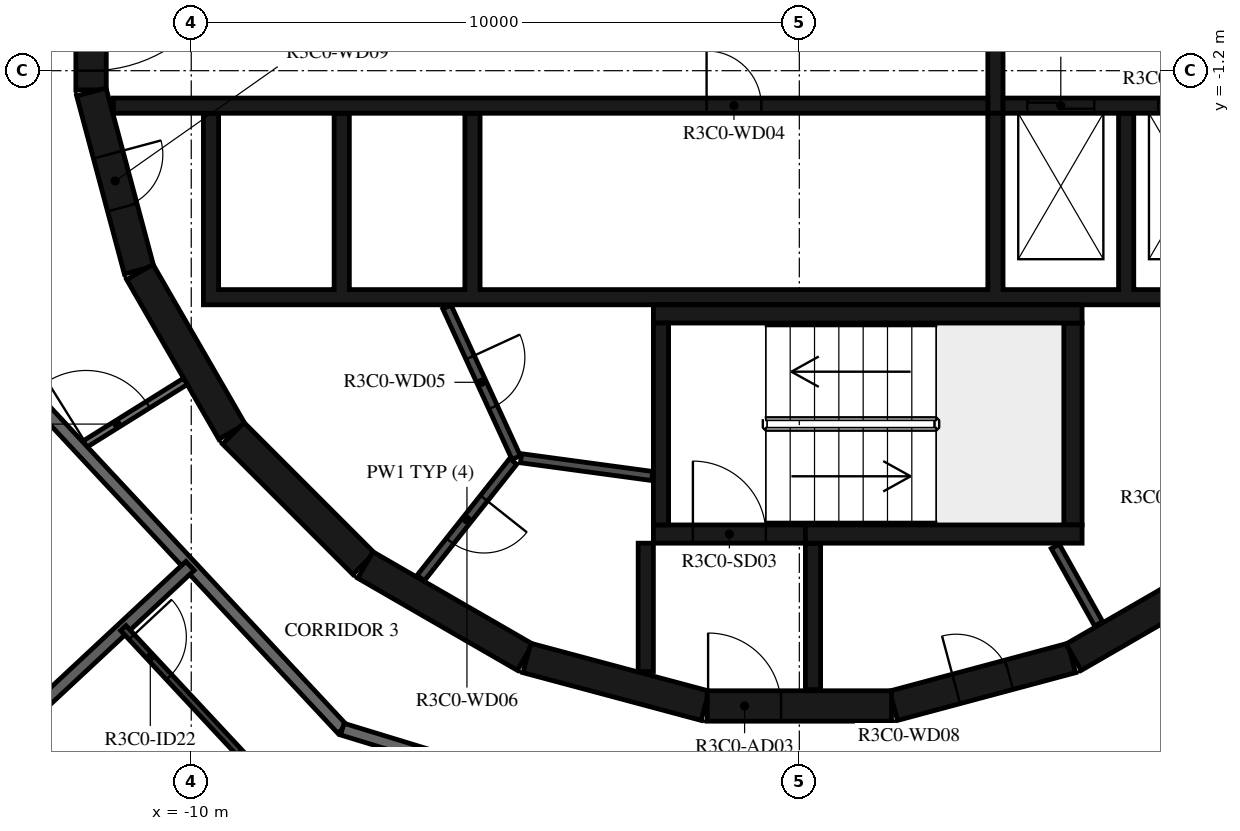
"""IFC4 building model, lengths in metres.
Left out: names, types, materials, properties, quantities, classifications, styles, units other than length and angle.
Written with IfcOpenShell. Run it as: python <this file> out.ifc"""

import sys

from ifc_helpers import new_model, si_unit, direction, frame, frame_2d, origin, place, context, subcontext, project, spatial, polyline, rectangle, outline, extrude, element, fill, save


model = new_model("IFC4")
c1 = context("Model", 3, precision=1e-05, world=origin(), true_north=direction((0.0, 1.0)))
c2 = subcontext(c1, "Body", "Model", "MODEL_VIEW")
j1 = project(units=[si_unit("LENGTHUNIT", "METRE"), si_unit("PLANEANGLEUNIT", "RADIAN")], contexts=[c1])
p1 = place(None, origin())
s1 = spatial("IfcSite", under=j1, at=p1, CompositionType="ELEMENT")
p2 = place(p1, origin())
s2 = spatial("IfcBuilding", under=s1, at=p2, CompositionType="ELEMENT")
p3 = place(p2, frame((0.0, 0.0, 141.4)))
s3 = spatial("IfcBuildingStorey", under=s2, at=p3, CompositionType="ELEMENT", Elevation=141.4)
p4 = place(p3, frame((1.55, -11.643, 0.0), z_axis=(0.0, 0.0, 1.0), x_axis=(0.965948410781, 0.258734743916, 0.0)))
e1 = element("IfcWall", 1, at=p4, inside=s3, PredefinedType="SHEAR", context=c2, shape_type="SweptSolid", body=[
    extrude(rectangle(XDim=3.033, YDim=0.5, at=frame_2d((1.516, 0.0))), origin(), (0.0, 0.0, 1.0), 3.05),
])
p5 = place(p4, frame((1.066, 0.0, 0.0)))
e2 = element("IfcOpeningElement", 2, at=p5, cuts=e1, PredefinedType="OPENING", context=c2, shape_type="SweptSolid", body=[
    extrude(rectangle(XDim=0.9, YDim=2.1, at=frame_2d((0.45, 1.05))), frame((0.0, 0.26, 0.0), z_axis=(0.0, -1.0, 0.0), x_axis=(1.0, 0.0, 0.0)), (0.0, 0.0, 1.0), 0.52),
])
p6 = place(p3, frame((4.51, -10.845, 0.0), z_axis=(0.0, 0.0, 1.0), x_axis=(0.865975092491, 0.500087131594, 0.0)))
e3 = element("IfcWall", 3, at=p6, inside=s3, PredefinedType="SHEAR", context=c2, shape_type="SweptSolid", body=[
    extrude(rectangle(XDim=3.033, YDim=0.5, at=frame_2d((1.516, 0.0))), origin(), (0.0, 0.0, 1.0), 3.05),
])
p7 = place(p3, frame((-11.647, 1.516, 0.0), z_axis=(0.0, 0.0, 1.0), x_axis=(0.0, -1.0, 0.0)))
e4 = element("IfcWall", 4, at=p7, inside=s3, PredefinedType="SHEAR", context=c2, shape_type="SweptSolid", body=[
    extrude(rectangle(XDim=3.033, YDim=0.5, at=frame_2d((1.516, 0.0))), origin(), (0.0, 0.0, 1.0), 3.05),
])
p8 = place(p7, frame((0.316, 0.0, 0.0)))
e5 = element("IfcOpeningElement", 5, at=p8, cuts=e4, PredefinedType="OPENING", context=c2, shape_type="SweptSolid", body=[
    extrude(rectangle(XDim=2.4, YDim=2.1, at=frame_2d((1.2, 1.05))), frame((0.0, 0.26, 0.0), z_axis=(0.0, -1.0, 0.0), x_axis=(1.0, 0.0, 0.0)), (0.0, 0.0, 1.0), 0.52),
])
p9 = place(p3, frame((-11.643, -1.55, 0.0), z_axis=(0.0, 0.0, 1.0), x_axis=(0.258734743916, -0.965948410781, 0.0)))
e6 = element("IfcWall", 6, at=p9, inside=s3, PredefinedType="SHEAR", context=c2, shape_type="SweptSolid", body=[
    extrude(rectangle(XDim=3.033, YDim=0.5, at=frame_2d((1.516, 0.0))), origin(), (0.0, 0.0, 1.0), 3.05),
])
p10 = place(p9, frame((1.066, 0.0, 0.0)))
e7 = element("IfcOpeningElement", 7, at=p10, cuts=e6, PredefinedType="OPENING", context=c2, shape_type="SweptSolid", body=[
    extrude(rectangle(XDim=0.9, YDim=2.1, at=frame_2d((0.45, 1.05))), frame((0.0, 0.26, 0.0), z_axis=(0.0, -1.0, 0.0), x_axis=(1.0, 0.0, 0.0)), (0.0, 0.0, 1.0), 0.52),
])
p11 = place(p3, frame((-10.845, -4.51, 0.0), z_axis=(0.0, 0.0, 1.0), x_axis=(0.500087131594, -0.865975092491, 0.0)))
e8 = element("IfcWall", 8, at=p11, inside=s3, PredefinedType="SHEAR", context=c2, shape_type="SweptSolid", body=[
    extrude(rectangle(XDim=3.033, YDim=0.5, at=frame_2d((1.516, 0.0))), origin(), (0.0, 0.0, 1.0), 3.05),
])
p12 = place(p3, frame((-9.308, -7.164, 0.0), z_axis=(0.0, 0.0, 1.0), x_axis=(0.707106781187, -0.707106781187, 0.0)))
e9 = element("IfcWall", 9, at=p12, inside=s3, PredefinedType="SHEAR", context=c2, shape_type="SweptSolid", body=[
    extrude(rectangle(XDim=3.032, YDim=0.5, at=frame_2d((1.516, 0.0))), origin(), (0.0, 0.0, 1.0), 3.05),
])
for number, where, z_axis, x_axis in (
    (10, (-7.137, -9.329, 0.0), (0.0, 0.0, 1.0), (0.866, -0.5, 0.0)),
    (11, (-4.479, -10.858, 0.0), (0.0, 0.0, 1.0), (0.966, -0.259, 0.0)),
):
    element("IfcWall", number, at=place(p3, frame(where, z_axis=z_axis, x_axis=x_axis)), inside=s3, PredefinedType="SHEAR", context=c2, shape_type="SweptSolid", body=[
        extrude(rectangle(XDim=3.033, YDim=0.5, at=frame_2d((1.516, 0.0))), origin(), (0.0, 0.0, 1.0), 3.05),
    ])
p13 = place(p3, frame((-1.516, -11.647, 0.0), z_axis=(0.0, 0.0, 1.0), x_axis=(1.0, 0.0, 0.0)))
e12 = element("IfcWall", 12, at=p13, inside=s3, PredefinedType="SHEAR", context=c2, shape_type="SweptSolid", body=[
    extrude(rectangle(XDim=3.033, YDim=0.5, at=frame_2d((1.516, 0.0))), origin(), (0.0, 0.0, 1.0), 3.05),
])
p14 = place(p13, frame((0.016, 0.0, 0.0)))
e13 = element("IfcOpeningElement", 13, at=p14, cuts=e12, PredefinedType="OPENING", context=c2, shape_type="SweptSolid", body=[
    extrude(rectangle(XDim=1.2, YDim=2.1, at=frame_2d((0.6, 1.05))), frame((0.0, 0.26, 0.0), z_axis=(0.0, -1.0, 0.0), x_axis=(1.0, 0.0, 0.0)), (0.0, 0.0, 1.0), 0.52),
])
p15 = place(p3, frame((-2.275, -8.67, 0.0), z_axis=(0.0, 0.0, 1.0), x_axis=(0.0, 1.0, 0.0)))
e14 = element("IfcWall", 14, at=p15, inside=s3, PredefinedType="SHEAR", context=c2, shape_type="SweptSolid", body=[
    extrude(rectangle(XDim=3.32, YDim=0.25, at=frame_2d((1.66, 0.0))), origin(), (0.0, 0.0, 1.0), 3.05),
])
p16 = place(p3, frame((-2.4, -5.2, 0.0), z_axis=(0.0, 0.0, 1.0), x_axis=(1.0, 0.0, 0.0)))
e15 = element("IfcWall", 15, at=p16, inside=s3, PredefinedType="SHEAR", context=c2, shape_type="SweptSolid", body=[
    extrude(rectangle(XDim=7.05, YDim=0.3, at=frame_2d((3.525, 0.0))), origin(), (0.0, 0.0, 1.0), 3.05),
])
p17 = place(p3, frame((4.5, -8.67, 0.0), z_axis=(0.0, 0.0, 1.0), x_axis=(0.0, 1.0, 0.0)))
e16 = element("IfcWall", 16, at=p17, inside=s3, PredefinedType="SHEAR", context=c2, shape_type="SweptSolid", body=[
    extrude(rectangle(XDim=3.32, YDim=0.3, at=frame_2d((1.66, 0.0))), origin(), (0.0, 0.0, 1.0), 3.05),
])
p18 = place(p3, frame((0.1, -8.82, 0.0), z_axis=(0.0, 0.0, 1.0), x_axis=(1.0, 0.0, 0.0)))
e17 = element("IfcWall", 17, at=p18, inside=s3, PredefinedType="SHEAR", context=c2, shape_type="SweptSolid", body=[
    extrude(rectangle(XDim=4.55, YDim=0.3, at=frame_2d((2.275, 0.0))), origin(), (0.0, 0.0, 1.0), 3.05),
])
p19 = place(p3, frame((-2.4, -8.82, 0.0), z_axis=(0.0, 0.0, 1.0), x_axis=(1.0, 0.0, 0.0)))
e18 = element("IfcWall", 18, at=p19, inside=s3, PredefinedType="SHEAR", context=c2, shape_type="SweptSolid", body=[
    extrude(rectangle(XDim=2.5, YDim=0.3, at=frame_2d((1.25, 0.0))), origin(), (0.0, 0.0, 1.0), 3.05),
])
p20 = place(p19, frame((0.65, 0.0, 0.0)))
e19 = element("IfcOpeningElement", 19, at=p20, cuts=e18, PredefinedType="OPENING", context=c2, shape_type="SweptSolid", body=[
    extrude(rectangle(XDim=1.2, YDim=2.1, at=frame_2d((0.6, 1.05))), frame((0.0, 0.16, 0.0), z_axis=(0.0, -1.0, 0.0), x_axis=(1.0, 0.0, 0.0)), (0.0, 0.0, 1.0), 0.32),
])
p21 = place(p3, frame((-2.525, -8.97, 0.0), z_axis=(0.0, 0.0, 1.0), x_axis=(0.0, -1.0, 0.0)))
e20 = element("IfcWall", 20, at=p21, inside=s3, PredefinedType="SHEAR", context=c2, shape_type="SweptSolid", body=[
    extrude(rectangle(XDim=2.11, YDim=0.25, at=frame_2d((1.055, 0.0))), origin(), (0.0, 0.0, 1.0), 3.05),
])
p22 = place(p3, frame((0.225, -8.97, 0.0), z_axis=(0.0, 0.0, 1.0), x_axis=(0.0, -1.0, 0.0)))
e21 = element("IfcWall", 21, at=p22, inside=s3, PredefinedType="SHEAR", context=c2, shape_type="SweptSolid", body=[
    extrude(rectangle(XDim=2.41, YDim=0.25, at=frame_2d((1.205, 0.0))), origin(), (0.0, 0.0, 1.0), 3.05),
])
p23 = place(p3, origin())
e22 = element("IfcWall", 22, at=p23, inside=s3, PredefinedType="SHEAR", context=c2, shape_type="SweptSolid", body=[
    extrude(outline(polyline([(9.8, -5.05), (9.8, -4.8), (9.8, -1.9), (9.55, -1.9), (9.55, -4.8), (7.65, -4.8), (7.65, -1.9), (7.4, -1.9), (7.4, -4.8), (5.5, -4.8), (5.5, -1.9), (5.25, -1.9), (5.25, -4.8), (3.35, -4.8), (3.35, -1.9), (3.1, -1.9), (3.1, -4.8), (-5.25, -4.8), (-5.25, -1.9), (-5.5, -1.9), (-5.5, -4.8), (-7.4, -4.8), (-7.4, -1.9), (-7.65, -1.9), (-7.65, -4.8), (-9.55, -4.8), (-9.55, -1.9), (-9.8, -1.9), (-9.8, -4.8), (-9.8, -5.05), (9.8, -5.05)])), origin(), (0.0, 0.0, 1.0), 3.05),
])
p24 = place(p3, frame((-11.28, -1.775, 0.0), z_axis=(0.0, 0.0, 1.0), x_axis=(1.0, 0.0, 0.0)))
e23 = element("IfcWall", 23, at=p24, inside=s3, PredefinedType="SHEAR", context=c2, shape_type="SweptSolid", body=[
    extrude(rectangle(XDim=14.38, YDim=0.25, at=frame_2d((7.19, 0.0))), origin(), (0.0, 0.0, 1.0), 3.05),
])
p25 = place(p24, frame((9.755, 0.0, 0.0)))
e24 = element("IfcOpeningElement", 24, at=p25, cuts=e23, PredefinedType="OPENING", context=c2, shape_type="SweptSolid", body=[
    extrude(rectangle(XDim=0.9, YDim=2.1, at=frame_2d((0.45, 1.05))), frame((0.0, 0.135, 0.0), z_axis=(0.0, -1.0, 0.0), x_axis=(1.0, 0.0, 0.0)), (0.0, 0.0, 1.0), 0.27),
])
p26 = place(p3, frame((3.35, -1.775, 0.0), z_axis=(0.0, 0.0, 1.0), x_axis=(1.0, 0.0, 0.0)))
e25 = element("IfcWall", 25, at=p26, inside=s3, PredefinedType="SHEAR", context=c2, shape_type="SweptSolid", body=[
    extrude(rectangle(XDim=7.93, YDim=0.25, at=frame_2d((3.965, 0.0))), origin(), (0.0, 0.0, 1.0), 3.05),
])
p27 = place(p26, frame((0.4, 0.0, 0.0)))
e26 = element("IfcOpeningElement", 26, at=p27, cuts=e25, PredefinedType="OPENING", context=c2, shape_type="SweptSolid", body=[
    extrude(rectangle(XDim=1.1, YDim=2.4, at=frame_2d((0.55, 1.2))), frame((0.0, 0.135, 0.0), z_axis=(0.0, -1.0, 0.0), x_axis=(1.0, 0.0, 0.0)), (0.0, 0.0, 1.0), 0.27),
])
p28 = place(p26, frame((2.55, 0.0, 0.0)))
e27 = element("IfcOpeningElement", 27, at=p28, cuts=e25, PredefinedType="OPENING", context=c2, shape_type="SweptSolid", body=[
    extrude(rectangle(XDim=1.1, YDim=2.4, at=frame_2d((0.55, 1.2))), frame((0.0, 0.135, 0.0), z_axis=(0.0, -1.0, 0.0), x_axis=(1.0, 0.0, 0.0)), (0.0, 0.0, 1.0), 0.27),
])
p29 = place(p26, frame((4.7, 0.0, 0.0)))
e28 = element("IfcOpeningElement", 28, at=p29, cuts=e25, PredefinedType="OPENING", context=c2, shape_type="SweptSolid", body=[
    extrude(rectangle(XDim=1.1, YDim=2.4, at=frame_2d((0.55, 1.2))), frame((0.0, 0.135, 0.0), z_axis=(0.0, -1.0, 0.0), x_axis=(1.0, 0.0, 0.0)), (0.0, 0.0, 1.0), 0.27),
])
p30 = place(p3, frame((3.225, -1.9, 0.0), z_axis=(0.0, 0.0, 1.0), x_axis=(0.0, 1.0, 0.0)))
e29 = element("IfcWall", 29, at=p30, inside=s3, PredefinedType="SHEAR", context=c2, shape_type="SweptSolid", body=[
    extrude(rectangle(XDim=3.8, YDim=0.25, at=frame_2d((1.9, 0.0))), origin(), (0.0, 0.0, 1.0), 3.05),
])
p31 = place(p3, frame((4.922, -10.296, 0.0), z_axis=(0.0, 0.0, 1.0), x_axis=(-0.48860846254, 0.872503163509, 0.0)))
e30 = element("IfcWall", 30, at=p31, inside=s3, PredefinedType="PARTITIONING", context=c2, shape_type="SweptSolid", body=[
    extrude(rectangle(XDim=1.459, YDim=0.15, at=frame_2d((0.73, 0.0))), origin(), (0.0, 0.0, 1.0), 3.05),
])
p32 = place(p3, frame((-5.795, -5.086, 0.0), z_axis=(0.0, 0.0, 1.0), x_axis=(0.417887867606, -0.908498613157, 0.0)))
e31 = element("IfcWall", 31, at=p32, inside=s3, PredefinedType="PARTITIONING", context=c2, shape_type="SweptSolid", body=[
    extrude(rectangle(XDim=2.726, YDim=0.15, at=frame_2d((1.363, 0.0))), origin(), (0.0, 0.0, 1.0), 3.05),
])
p33 = place(p32, frame((0.913, 0.0, 0.0)))
e32 = element("IfcOpeningElement", 32, at=p33, cuts=e31, PredefinedType="OPENING", context=c2, shape_type="SweptSolid", body=[
    extrude(rectangle(XDim=0.9, YDim=2.1, at=frame_2d((0.45, 1.05))), frame((0.0, 0.085, 0.0), z_axis=(0.0, -1.0, 0.0), x_axis=(1.0, 0.0, 0.0)), (0.0, 0.0, 1.0), 0.17),
])
p34 = place(p3, frame((-4.706, -7.625, 0.0), z_axis=(0.0, 0.0, 1.0), x_axis=(-0.621392599334, -0.783499353856, 0.0)))
e33 = element("IfcWall", 33, at=p34, inside=s3, PredefinedType="PARTITIONING", context=c2, shape_type="SweptSolid", body=[
    extrude(rectangle(XDim=2.447, YDim=0.15, at=frame_2d((1.224, 0.0))), origin(), (0.0, 0.0, 1.0), 3.05),
])
p35 = place(p34, frame((0.774, 0.0, 0.0)))
e34 = element("IfcOpeningElement", 34, at=p35, cuts=e33, PredefinedType="OPENING", context=c2, shape_type="SweptSolid", body=[
    extrude(rectangle(XDim=0.9, YDim=2.1, at=frame_2d((0.45, 1.05))), frame((0.0, 0.085, 0.0), z_axis=(0.0, -1.0, 0.0), x_axis=(1.0, 0.0, 0.0)), (0.0, 0.0, 1.0), 0.17),
])
p36 = place(p3, frame((-2.42, -7.865, 0.0), z_axis=(0.0, 0.0, 1.0), x_axis=(-0.990972299108, 0.134066783362, 0.0)))
e35 = element("IfcWall", 35, at=p36, inside=s3, PredefinedType="PARTITIONING", context=c2, shape_type="SweptSolid", body=[
    extrude(rectangle(XDim=2.176, YDim=0.15, at=frame_2d((1.088, 0.0))), origin(), (0.0, 0.0, 1.0), 3.05),
])
p37 = place(p3, frame((-11.836, -7.396, 0.0), z_axis=(0.0, 0.0, 1.0), x_axis=(0.848071831599, 0.529881277692, 0.0)))
e36 = element("IfcWall", 36, at=p37, inside=s3, PredefinedType="PARTITIONING", context=c2, shape_type="SweptSolid", body=[
    extrude(rectangle(XDim=2.052, YDim=0.12, at=frame_2d((1.026, 0.0))), origin(), (0.0, 0.0, 1.0), 3.05),
])
p38 = place(p37, frame((0.125, 0.0, 0.0)))
e37 = element("IfcOpeningElement", 37, at=p38, cuts=e36, PredefinedType="OPENING", context=c2, shape_type="SweptSolid", body=[
    extrude(rectangle(XDim=1.2, YDim=2.1, at=frame_2d((0.6, 1.05))), frame((0.0, 0.07, 0.0), z_axis=(0.0, -1.0, 0.0), x_axis=(1.0, 0.0, 0.0)), (0.0, 0.0, 1.0), 0.14),
])
p39 = place(p3, frame((-12.523, -6.659, 0.0), z_axis=(0.0, 0.0, 1.0), x_axis=(0.682001841105, -0.731350455479, 0.0)))
e38 = element("IfcWall", 38, at=p39, inside=s3, PredefinedType="STANDARD", context=c2, shape_type="SweptSolid", body=[
    extrude(rectangle(XDim=7.342, YDim=0.2, at=frame_2d((3.671, 0.0))), origin(), (0.0, 0.0, 1.0), 3.05),
])
p40 = place(p3, frame((-7.516, -12.028, 0.0), z_axis=(0.0, 0.0, 1.0), x_axis=(0.956306642771, -0.292365533182, 0.0)))
e39 = element("IfcWall", 39, at=p40, inside=s3, PredefinedType="STANDARD", context=c2, shape_type="SweptSolid", body=[
    extrude(rectangle(XDim=7.342, YDim=0.2, at=frame_2d((3.671, 0.0))), origin(), (0.0, 0.0, 1.0), 3.05),
])
p41 = place(p40, frame((5.745, 0.0, 0.0)))
e40 = element("IfcOpeningElement", 40, at=p41, cuts=e39, PredefinedType="OPENING", context=c2, shape_type="SweptSolid", body=[
    extrude(rectangle(XDim=1.0, YDim=2.1, at=frame_2d((0.5, 1.05))), frame((0.0, 0.11, 0.0), z_axis=(0.0, -1.0, 0.0), x_axis=(1.0, 0.0, 0.0)), (0.0, 0.0, 1.0), 0.22),
])
p42 = place(p3, frame((-13.699, -12.774, 0.0), z_axis=(0.0, 0.0, 1.0), x_axis=(0.731353758457, 0.681998299111, 0.0)))
e41 = element("IfcWall", 41, at=p42, inside=s3, PredefinedType="STANDARD", context=c2, shape_type="SweptSolid", body=[
    extrude(rectangle(XDim=5.031, YDim=0.2, at=frame_2d((2.515, 0.0))), origin(), (0.0, 0.0, 1.0), 3.05),
])
p43 = place(p3, frame((-11.117, -10.366, 0.0), z_axis=(0.0, 0.0, 1.0), x_axis=(0.682029016154, -0.73132511315, 0.0)))
e42 = element("IfcWall", 42, at=p43, inside=s3, PredefinedType="PARTITIONING", context=c2, shape_type="SweptSolid", body=[
    extrude(rectangle(XDim=2.858, YDim=0.12, at=frame_2d((1.429, 0.0))), origin(), (0.0, 0.0, 1.0), 3.05),
])
p44 = place(p43, frame((0.2, 0.0, 0.0)))
e43 = element("IfcOpeningElement", 43, at=p44, cuts=e42, PredefinedType="OPENING", context=c2, shape_type="SweptSolid", body=[
    extrude(rectangle(XDim=0.9, YDim=2.1, at=frame_2d((0.45, 1.05))), frame((0.0, 0.07, 0.0), z_axis=(0.0, -1.0, 0.0), x_axis=(1.0, 0.0, 0.0)), (0.0, 0.0, 1.0), 0.14),
])
p45 = place(p20, origin())
e44 = element("IfcDoor", 44, at=p45, inside=s3, OperationType="SINGLE_SWING_LEFT", PredefinedType="DOOR", context=c2, shape_type="SweptSolid", body=[
    extrude(rectangle(XDim=1.2, YDim=2.1, at=frame_2d((0.6, 1.05))), frame((0.0, 0.025, 0.0), z_axis=(0.0, -1.0, 0.0), x_axis=(1.0, 0.0, 0.0)), (0.0, 0.0, 1.0), 0.05),
])
fill(e19, e44)
p46 = place(p14, origin())
e45 = element("IfcDoor", 45, at=p46, inside=s3, OperationType="SINGLE_SWING_RIGHT", PredefinedType="DOOR", context=c2, shape_type="SweptSolid", body=[
    extrude(rectangle(XDim=1.2, YDim=2.1, at=frame_2d((0.6, 1.05))), frame((0.0, 0.025, 0.0), z_axis=(0.0, -1.0, 0.0), x_axis=(1.0, 0.0, 0.0)), (0.0, 0.0, 1.0), 0.05),
])
fill(e13, e45)
p47 = place(p8, origin())
e46 = element("IfcDoor", 46, at=p47, inside=s3, OperationType="DOUBLE_DOOR_SINGLE_SWING", PredefinedType="DOOR", context=c2, shape_type="SweptSolid", body=[
    extrude(rectangle(XDim=2.4, YDim=2.1, at=frame_2d((1.2, 1.05))), frame((0.0, 0.025, 0.0), z_axis=(0.0, -1.0, 0.0), x_axis=(1.0, 0.0, 0.0)), (0.0, 0.0, 1.0), 0.05),
])
fill(e5, e46)
p48 = place(p27, origin())
e47 = element("IfcDoor", 47, at=p48, inside=s3, OperationType="DOUBLE_DOOR_SLIDING", PredefinedType="DOOR", context=c2, shape_type="SweptSolid", body=[
    extrude(rectangle(XDim=1.1, YDim=2.4, at=frame_2d((0.55, 1.2))), frame((0.0, 0.025, 0.0), z_axis=(0.0, -1.0, 0.0), x_axis=(1.0, 0.0, 0.0)), (0.0, 0.0, 1.0), 0.05),
])
fill(e26, e47)
p49 = place(p28, origin())
e48 = element("IfcDoor", 48, at=p49, inside=s3, OperationType="DOUBLE_DOOR_SLIDING", PredefinedType="DOOR", context=c2, shape_type="SweptSolid", body=[
    extrude(rectangle(XDim=1.1, YDim=2.4, at=frame_2d((0.55, 1.2))), frame((0.0, 0.025, 0.0), z_axis=(0.0, -1.0, 0.0), x_axis=(1.0, 0.0, 0.0)), (0.0, 0.0, 1.0), 0.05),
])
fill(e27, e48)
p50 = place(p25, origin())
e49 = element("IfcDoor", 49, at=p50, inside=s3, OperationType="SINGLE_SWING_LEFT", PredefinedType="DOOR", context=c2, shape_type="SweptSolid", body=[
    extrude(rectangle(XDim=0.9, YDim=2.1, at=frame_2d((0.45, 1.05))), frame((0.0, 0.025, 0.0), z_axis=(0.0, -1.0, 0.0), x_axis=(1.0, 0.0, 0.0)), (0.0, 0.0, 1.0), 0.05),
])
fill(e24, e49)
p51 = place(p33, origin())
e50 = element("IfcDoor", 50, at=p51, inside=s3, OperationType="SINGLE_SWING_RIGHT", PredefinedType="DOOR", context=c2, shape_type="SweptSolid", body=[
    extrude(rectangle(XDim=0.9, YDim=2.1, at=frame_2d((0.45, 1.05))), frame((0.0, 0.025, 0.0), z_axis=(0.0, -1.0, 0.0), x_axis=(1.0, 0.0, 0.0)), (0.0, 0.0, 1.0), 0.05),
])
fill(e32, e50)
p52 = place(p35, origin())
e51 = element("IfcDoor", 51, at=p52, inside=s3, OperationType="SINGLE_SWING_LEFT", PredefinedType="DOOR", context=c2, shape_type="SweptSolid", body=[
    extrude(rectangle(XDim=0.9, YDim=2.1, at=frame_2d((0.45, 1.05))), frame((0.0, 0.025, 0.0), z_axis=(0.0, -1.0, 0.0), x_axis=(1.0, 0.0, 0.0)), (0.0, 0.0, 1.0), 0.05),
])
fill(e34, e51)
p53 = place(p5, origin())
e52 = element("IfcDoor", 52, at=p53, inside=s3, OperationType="SINGLE_SWING_LEFT", PredefinedType="DOOR", context=c2, shape_type="SweptSolid", body=[
    extrude(rectangle(XDim=0.9, YDim=2.1, at=frame_2d((0.45, 1.05))), frame((0.0, 0.025, 0.0), z_axis=(0.0, -1.0, 0.0), x_axis=(1.0, 0.0, 0.0)), (0.0, 0.0, 1.0), 0.05),
])
fill(e2, e52)
p54 = place(p10, origin())
e53 = element("IfcDoor", 53, at=p54, inside=s3, OperationType="SINGLE_SWING_RIGHT", PredefinedType="DOOR", context=c2, shape_type="SweptSolid", body=[
    extrude(rectangle(XDim=0.9, YDim=2.1, at=frame_2d((0.45, 1.05))), frame((0.0, 0.025, 0.0), z_axis=(0.0, -1.0, 0.0), x_axis=(1.0, 0.0, 0.0)), (0.0, 0.0, 1.0), 0.05),
])
fill(e7, e53)
p55 = place(p44, origin())
e54 = element("IfcDoor", 54, at=p55, inside=s3, OperationType="SINGLE_SWING_LEFT", PredefinedType="DOOR", context=c2, shape_type="SweptSolid", body=[
    extrude(rectangle(XDim=0.9, YDim=2.1, at=frame_2d((0.45, 1.05))), frame((0.0, 0.025, 0.0), z_axis=(0.0, -1.0, 0.0), x_axis=(1.0, 0.0, 0.0)), (0.0, 0.0, 1.0), 0.05),
])
fill(e43, e54)
p56 = place(p38, origin())
e55 = element("IfcDoor", 55, at=p56, inside=s3, OperationType="DOUBLE_DOOR_SINGLE_SWING", PredefinedType="DOOR", context=c2, shape_type="SweptSolid", body=[
    extrude(rectangle(XDim=1.2, YDim=2.1, at=frame_2d((0.6, 1.05))), frame((0.0, 0.025, 0.0), z_axis=(0.0, -1.0, 0.0), x_axis=(1.0, 0.0, 0.0)), (0.0, 0.0, 1.0), 0.05),
])
fill(e37, e55)
save(model, sys.argv[1])
